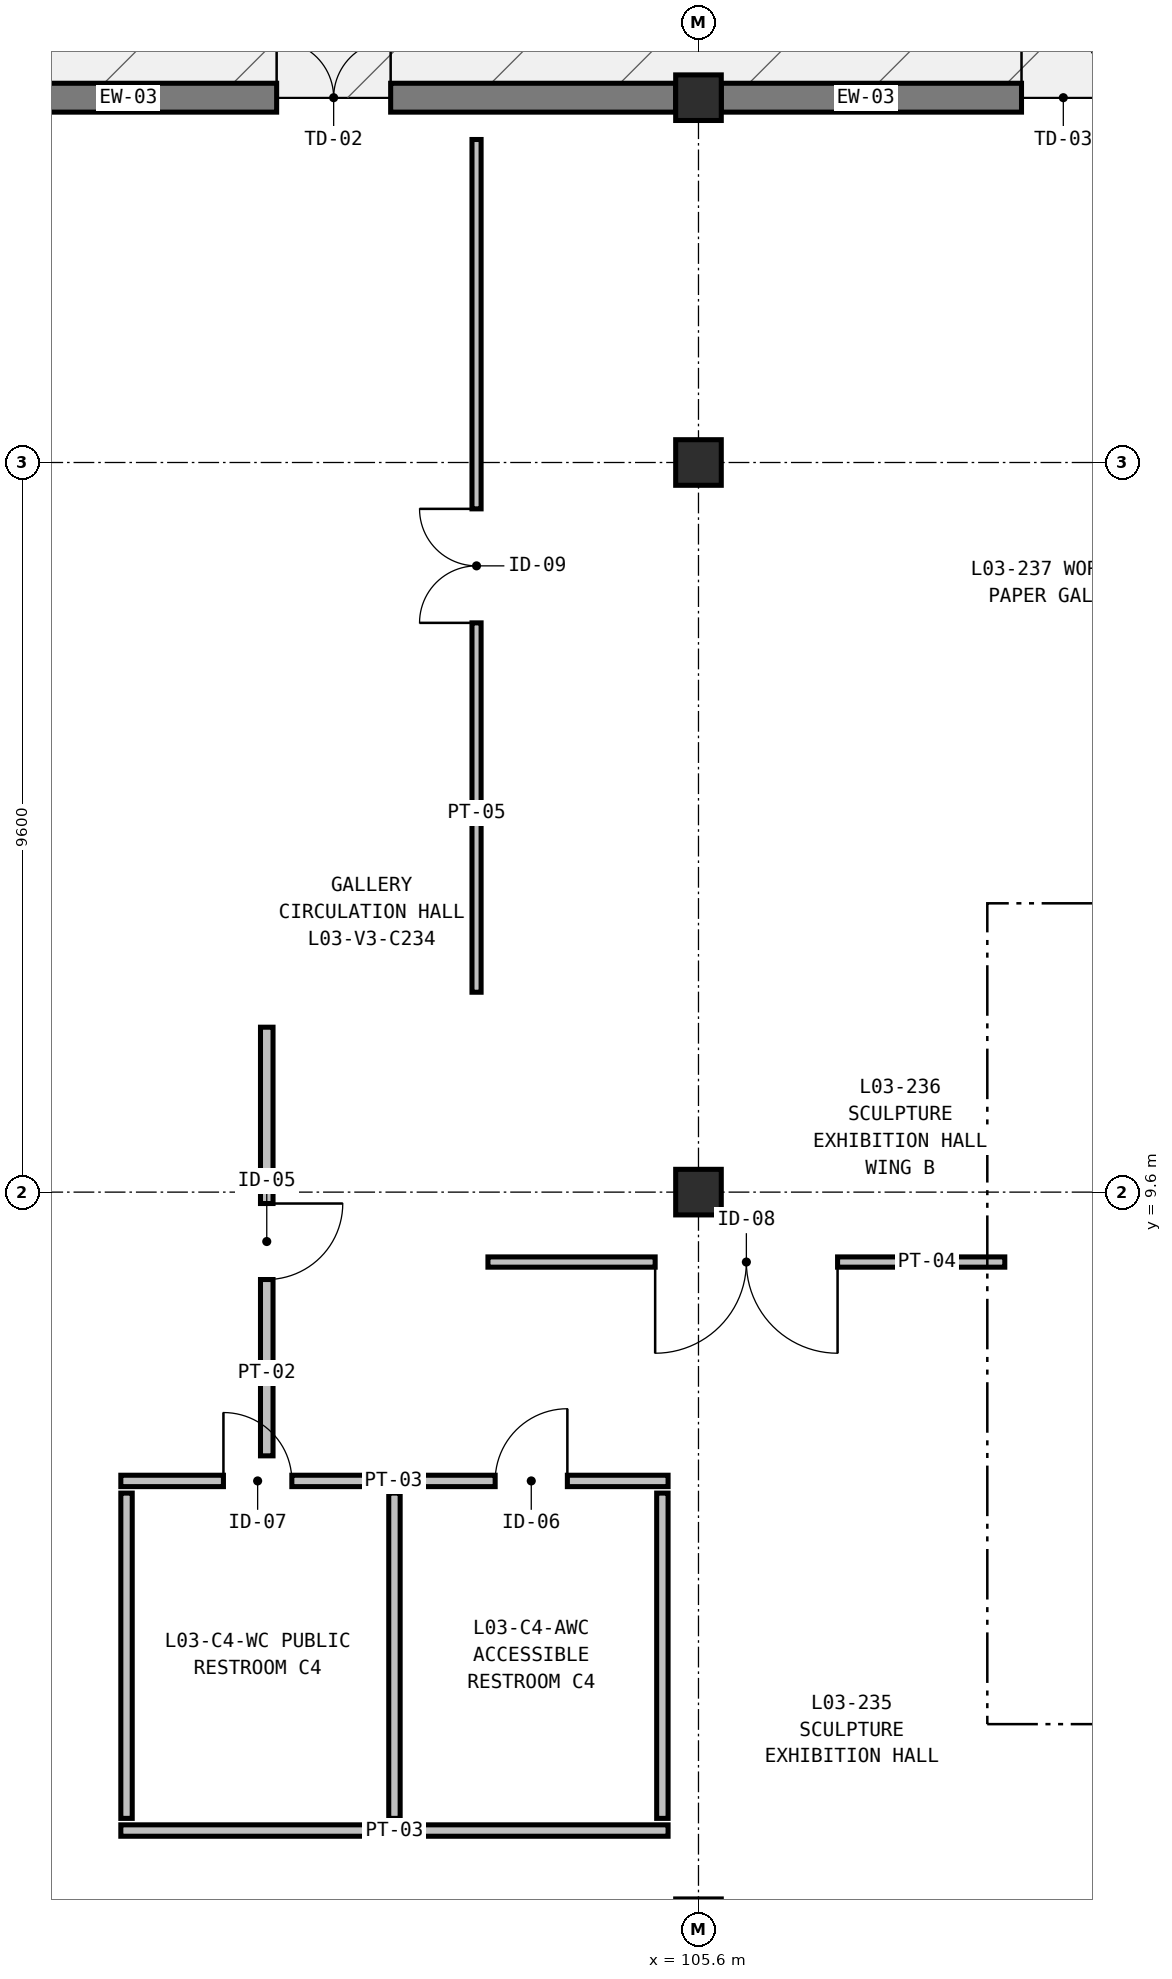
"""IFC4 building model, lengths in metres.
Left out: names, types, materials, properties, quantities, classifications, styles, units other than length and angle.
Written with IfcOpenShell. Run it as: python <this file> out.ifc"""

import sys

from ifc_helpers import new_model, si_unit, direction, frame, frame_2d, origin, origin_2d, place, context, subcontext, project, spatial, rectangle, extrude, element, fill, save


model = new_model("IFC4")
c1 = context("Model", 3, precision=1e-05, world=origin(), true_north=direction((0.0, 1.0)))
c2 = subcontext(c1, "Body", "Model", "MODEL_VIEW")
j1 = project(units=[si_unit("LENGTHUNIT", "METRE"), si_unit("PLANEANGLEUNIT", "RADIAN")], contexts=[c1])
p1 = place(None, origin())
s1 = spatial("IfcSite", under=j1, at=p1, CompositionType="ELEMENT")
p2 = place(p1, origin())
s2 = spatial("IfcBuilding", under=s1, at=p2, CompositionType="ELEMENT")
p3 = place(p2, frame((0.0, 0.0, 16.8)))
s3 = spatial("IfcBuildingStorey", under=s2, at=p3, CompositionType="ELEMENT", Elevation=16.8)
for number, where, z_axis, x_axis in (
    (1, (105.6, 9.6, 0.0), (0.0, 0.0, 1.0), (1.0, 0.0, 0.0)),
    (2, (105.6, 19.2, 0.0), (0.0, 0.0, 1.0), (1.0, 0.0, 0.0)),
    (3, (105.6, 24.0, 0.0), (0.0, 0.0, 1.0), (1.0, 0.0, 0.0)),
):
    element("IfcColumn", number, at=place(p3, frame(where, z_axis=z_axis, x_axis=x_axis)), inside=s3, PredefinedType="COLUMN", context=c2, shape_type="SweptSolid", body=[
        extrude(rectangle(XDim=0.6, YDim=0.6, at=origin_2d()), origin(), (0.0, 0.0, 1.0), 5.4),
    ])
p4 = place(p3, frame((96.3, 24.0, 0.0), z_axis=(0.0, 0.0, 1.0), x_axis=(1.0, 0.0, 0.0)))
e4 = element("IfcWall", 4, at=p4, inside=s3, PredefinedType="SOLIDWALL", context=c2, shape_type="SweptSolid", body=[
    extrude(rectangle(XDim=9.0, YDim=0.38, at=frame_2d((4.5, 0.0))), origin(), (0.0, 0.0, 1.0), 5.1),
])
p5 = place(p4, frame((3.75, 0.0, 0.0)))
e5 = element("IfcOpeningElement", 5, at=p5, cuts=e4, PredefinedType="OPENING", context=c2, shape_type="SweptSolid", body=[
    extrude(rectangle(XDim=1.5, YDim=2.25, at=frame_2d((0.75, 1.125))), frame((0.0, 0.2, 0.0), z_axis=(0.0, -1.0, 0.0), x_axis=(1.0, 0.0, 0.0)), (0.0, 0.0, 1.0), 0.4),
])
p6 = place(p3, frame((105.9, 24.0, 0.0), z_axis=(0.0, 0.0, 1.0), x_axis=(1.0, 0.0, 0.0)))
e6 = element("IfcWall", 6, at=p6, inside=s3, PredefinedType="SOLIDWALL", context=c2, shape_type="SweptSolid", body=[
    extrude(rectangle(XDim=9.0, YDim=0.38, at=frame_2d((4.5, 0.0))), origin(), (0.0, 0.0, 1.0), 5.1),
])
p7 = place(p6, frame((3.95, 0.0, 0.0)))
e7 = element("IfcOpeningElement", 7, at=p7, cuts=e6, PredefinedType="OPENING", context=c2, shape_type="SweptSolid", body=[
    extrude(rectangle(XDim=1.1, YDim=2.2, at=frame_2d((0.55, 1.1))), frame((0.0, 0.2, 0.0), z_axis=(0.0, -1.0, 0.0), x_axis=(1.0, 0.0, 0.0)), (0.0, 0.0, 1.0), 0.4),
])
p8 = place(p3, frame((98.0, 5.8, 0.0), z_axis=(0.0, 0.0, 1.0), x_axis=(1.0, 0.0, 0.0)))
e8 = element("IfcWall", 8, at=p8, inside=s3, PredefinedType="PARTITIONING", context=c2, shape_type="SweptSolid", body=[
    extrude(rectangle(XDim=7.2, YDim=0.15, at=frame_2d((3.6, 0.0))), origin(), (0.0, 0.0, 1.0), 5.1),
])
p9 = place(p8, frame((1.35, 0.0, 0.0)))
e9 = element("IfcOpeningElement", 9, at=p9, cuts=e8, PredefinedType="OPENING", context=c2, shape_type="SweptSolid", body=[
    extrude(rectangle(XDim=0.9, YDim=2.1, at=frame_2d((0.45, 1.05))), frame((0.0, 0.085, 0.0), z_axis=(0.0, -1.0, 0.0), x_axis=(1.0, 0.0, 0.0)), (0.0, 0.0, 1.0), 0.17),
])
p10 = place(p8, frame((4.925, 0.0, 0.0)))
e10 = element("IfcOpeningElement", 10, at=p10, cuts=e8, PredefinedType="OPENING", context=c2, shape_type="SweptSolid", body=[
    extrude(rectangle(XDim=0.95, YDim=2.15, at=frame_2d((0.475, 1.075))), frame((0.0, 0.085, 0.0), z_axis=(0.0, -1.0, 0.0), x_axis=(1.0, 0.0, 0.0)), (0.0, 0.0, 1.0), 0.17),
])
p11 = place(p3, frame((98.0, 1.2, 0.0), z_axis=(0.0, 0.0, 1.0), x_axis=(1.0, 0.0, 0.0)))
e11 = element("IfcWall", 11, at=p11, inside=s3, PredefinedType="PARTITIONING", context=c2, shape_type="SweptSolid", body=[
    extrude(rectangle(XDim=7.2, YDim=0.15, at=frame_2d((3.6, 0.0))), origin(), (0.0, 0.0, 1.0), 5.1),
])
for number, where, z_axis, x_axis in (
    (12, (98.075, 1.36, 0.0), (0.0, 0.0, 1.0), (0.0, 1.0, 0.0)),
    (13, (101.6, 1.36, 0.0), (0.0, 0.0, 1.0), (0.0, 1.0, 0.0)),
    (14, (105.125, 1.36, 0.0), (0.0, 0.0, 1.0), (0.0, 1.0, 0.0)),
):
    element("IfcWall", number, at=place(p3, frame(where, z_axis=z_axis, x_axis=x_axis)), inside=s3, PredefinedType="PARTITIONING", context=c2, shape_type="SweptSolid", body=[
        extrude(rectangle(XDim=4.28, YDim=0.15, at=frame_2d((2.14, 0.0))), origin(), (0.0, 0.0, 1.0), 4.475),
    ])
p12 = place(p3, frame((99.92, 11.77, 0.0), z_axis=(0.0, 0.0, 1.0), x_axis=(0.0, -1.0, 0.0)))
e15 = element("IfcWall", 15, at=p12, inside=s3, PredefinedType="PARTITIONING", context=c2, shape_type="SweptSolid", body=[
    extrude(rectangle(XDim=5.64, YDim=0.165, at=frame_2d((2.82, 0.0))), origin(), (0.0, 0.0, 1.0), 4.325),
])
p13 = place(p12, frame((2.32, 0.0, 0.0)))
e16 = element("IfcOpeningElement", 16, at=p13, cuts=e15, PredefinedType="OPENING", context=c2, shape_type="SweptSolid", body=[
    extrude(rectangle(XDim=1.0, YDim=2.15, at=frame_2d((0.5, 1.075))), frame((0.0, 0.093, 0.0), z_axis=(0.0, -1.0, 0.0), x_axis=(1.0, 0.0, 0.0)), (0.0, 0.0, 1.0), 0.185),
])
p14 = place(p3, frame((109.63, 8.68, 0.0), z_axis=(0.0, 0.0, 1.0), x_axis=(-1.0, 0.0, 0.0)))
e17 = element("IfcWall", 17, at=p14, inside=s3, PredefinedType="PARTITIONING", context=c2, shape_type="SweptSolid", body=[
    extrude(rectangle(XDim=6.8, YDim=0.135, at=frame_2d((3.4, 0.0))), origin(), (0.0, 0.0, 1.0), 4.275),
])
p15 = place(p14, frame((2.2, 0.0, 0.0)))
e18 = element("IfcOpeningElement", 18, at=p15, cuts=e17, PredefinedType="OPENING", context=c2, shape_type="SweptSolid", body=[
    extrude(rectangle(XDim=2.4, YDim=2.6, at=frame_2d((1.2, 1.3))), frame((0.0, 0.077, 0.0), z_axis=(0.0, -1.0, 0.0), x_axis=(1.0, 0.0, 0.0)), (0.0, 0.0, 1.0), 0.155),
])
p16 = place(p3, frame((102.68, 12.23, 0.0), z_axis=(0.0, 0.0, 1.0), x_axis=(0.0, 1.0, 0.0)))
e19 = element("IfcWall", 19, at=p16, inside=s3, PredefinedType="PARTITIONING", context=c2, shape_type="SweptSolid", body=[
    extrude(rectangle(XDim=11.22, YDim=0.12, at=frame_2d((5.61, 0.0))), origin(), (0.0, 0.0, 1.0), 4.325),
])
p17 = place(p16, frame((4.86, 0.0, 0.0)))
e20 = element("IfcOpeningElement", 20, at=p17, cuts=e19, PredefinedType="OPENING", context=c2, shape_type="SweptSolid", body=[
    extrude(rectangle(XDim=1.5, YDim=2.3, at=frame_2d((0.75, 1.15))), frame((0.0, 0.07, 0.0), z_axis=(0.0, -1.0, 0.0), x_axis=(1.0, 0.0, 0.0)), (0.0, 0.0, 1.0), 0.14),
])
p18 = place(p5, origin())
e21 = element("IfcDoor", 21, at=p18, inside=s3, OperationType="DOUBLE_DOOR_SINGLE_SWING", PredefinedType="DOOR", context=c2, shape_type="SweptSolid", body=[
    extrude(rectangle(XDim=1.5, YDim=2.25, at=frame_2d((0.75, 1.125))), frame((0.0, 0.025, 0.0), z_axis=(0.0, -1.0, 0.0), x_axis=(1.0, 0.0, 0.0)), (0.0, 0.0, 1.0), 0.05),
])
fill(e5, e21)
p19 = place(p7, origin())
e22 = element("IfcDoor", 22, at=p19, inside=s3, OperationType="SINGLE_SWING_LEFT", PredefinedType="DOOR", context=c2, shape_type="SweptSolid", body=[
    extrude(rectangle(XDim=1.1, YDim=2.2, at=frame_2d((0.55, 1.1))), frame((0.0, 0.025, 0.0), z_axis=(0.0, -1.0, 0.0), x_axis=(1.0, 0.0, 0.0)), (0.0, 0.0, 1.0), 0.05),
])
fill(e7, e22)
p20 = place(p9, origin())
e23 = element("IfcDoor", 23, at=p20, inside=s3, OperationType="SINGLE_SWING_LEFT", PredefinedType="DOOR", context=c2, shape_type="SweptSolid", body=[
    extrude(rectangle(XDim=0.9, YDim=2.1, at=frame_2d((0.45, 1.05))), frame((0.0, 0.025, 0.0), z_axis=(0.0, -1.0, 0.0), x_axis=(1.0, 0.0, 0.0)), (0.0, 0.0, 1.0), 0.05),
])
fill(e9, e23)
p21 = place(p10, origin())
e24 = element("IfcDoor", 24, at=p21, inside=s3, OperationType="SINGLE_SWING_RIGHT", PredefinedType="DOOR", context=c2, shape_type="SweptSolid", body=[
    extrude(rectangle(XDim=0.95, YDim=2.15, at=frame_2d((0.475, 1.075))), frame((0.0, 0.025, 0.0), z_axis=(0.0, -1.0, 0.0), x_axis=(1.0, 0.0, 0.0)), (0.0, 0.0, 1.0), 0.05),
])
fill(e10, e24)
p22 = place(p13, origin())
e25 = element("IfcDoor", 25, at=p22, inside=s3, OperationType="SINGLE_SWING_LEFT", PredefinedType="DOOR", context=c2, shape_type="SweptSolid", body=[
    extrude(rectangle(XDim=1.0, YDim=2.15, at=frame_2d((0.5, 1.075))), frame((0.0, 0.025, 0.0), z_axis=(0.0, -1.0, 0.0), x_axis=(1.0, 0.0, 0.0)), (0.0, 0.0, 1.0), 0.05),
])
fill(e16, e25)
p23 = place(p15, origin())
e26 = element("IfcDoor", 26, at=p23, inside=s3, OperationType="DOUBLE_DOOR_SINGLE_SWING", PredefinedType="DOOR", context=c2, shape_type="SweptSolid", body=[
    extrude(rectangle(XDim=2.4, YDim=2.6, at=frame_2d((1.2, 1.3))), frame((0.0, 0.025, 0.0), z_axis=(0.0, -1.0, 0.0), x_axis=(1.0, 0.0, 0.0)), (0.0, 0.0, 1.0), 0.05),
])
fill(e18, e26)
p24 = place(p17, origin())
e27 = element("IfcDoor", 27, at=p24, inside=s3, OperationType="DOUBLE_DOOR_SINGLE_SWING", PredefinedType="DOOR", context=c2, shape_type="SweptSolid", body=[
    extrude(rectangle(XDim=1.5, YDim=2.3, at=frame_2d((0.75, 1.15))), frame((0.0, 0.025, 0.0), z_axis=(0.0, -1.0, 0.0), x_axis=(1.0, 0.0, 0.0)), (0.0, 0.0, 1.0), 0.05),
])
fill(e20, e27)
save(model, sys.argv[1])
